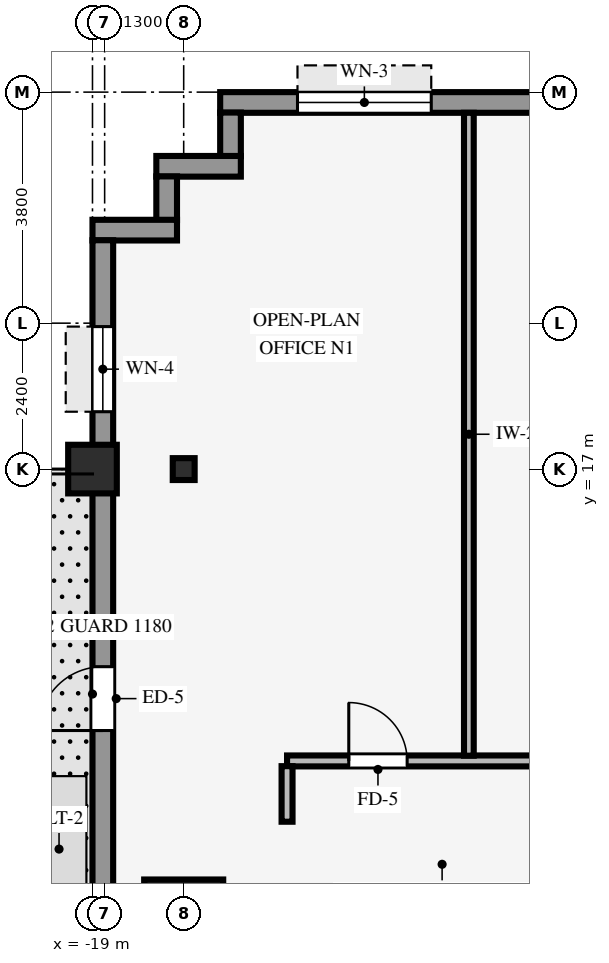
"""IFC4 building model, lengths in metres.
Left out: names, types, materials, properties, quantities, classifications, styles, units other than length and angle.
Written with IfcOpenShell. Run it as: python <this file> out.ifc"""

import sys

from ifc_helpers import new_model, si_unit, direction, frame, frame_2d, origin, origin_2d, place, context, subcontext, project, spatial, rectangle, hollow_rectangle, i_section, extrude, source, transform, mapped, element, fill, save


model = new_model("IFC4")
c1 = context("Model", 3, precision=1e-05, world=origin(), true_north=direction((0.0, 1.0)))
c2 = subcontext(c1, "Body", "Model", "MODEL_VIEW")
j1 = project(units=[si_unit("LENGTHUNIT", "METRE"), si_unit("PLANEANGLEUNIT", "RADIAN")], contexts=[c1])
p1 = place(None, origin())
s1 = spatial("IfcSite", under=j1, at=p1, CompositionType="ELEMENT")
p2 = place(p1, origin())
s2 = spatial("IfcBuilding", under=s1, at=p2, CompositionType="ELEMENT")
p3 = place(p2, frame((0.0, 0.0, 27.6)))
s3 = spatial("IfcBuildingStorey", under=s2, at=p3, CompositionType="ELEMENT", Elevation=27.6)
p4 = place(p3, frame((-17.5, 9.6, 0.0), z_axis=(0.0, 0.0, 1.0), x_axis=(1.0, 0.0, 0.0)))
e1 = element("IfcColumn", 1, at=p4, inside=s3, PredefinedType="COLUMN", context=c2, shape_type="SweptSolid", body=[
    extrude(rectangle(XDim=1.3, YDim=1.3, at=origin_2d()), origin(), (0.0, 0.0, 1.0), 3.37),
])
p5 = place(p3, frame((-19.0, 17.0, 0.0), z_axis=(0.0, 0.0, 1.0), x_axis=(1.0, 0.0, 0.0)))
e2 = element("IfcColumn", 2, at=p5, inside=s3, PredefinedType="COLUMN", context=c2, shape_type="SweptSolid", body=[
    extrude(hollow_rectangle(XDim=0.8, YDim=0.8, WallThickness=0.055, InnerFilletRadius=0.055, OuterFilletRadius=0.11, at=origin_2d()), origin(), (0.0, 0.0, 1.0), 3.37),
])
p6 = place(p3, frame((-17.5, 17.0, -0.4), z_axis=(0.0, 0.0, 1.0), x_axis=(1.0, 0.0, 0.0)))
e3 = element("IfcColumn", 3, at=p6, inside=s3, PredefinedType="COLUMN", context=c2, shape_type="SweptSolid", body=[
    extrude(i_section(OverallWidth=0.36, OverallDepth=0.36, WebThickness=0.021, FlangeThickness=0.021, FilletRadius=0.018, at=origin_2d()), origin(), (0.0, 0.0, 1.0), 3.77),
])
p7 = place(p3, frame((-16.9, 23.03, 0.0), z_axis=(0.0, 0.0, 1.0), x_axis=(1.0, 0.0, 0.0)))
e4 = element("IfcWall", 4, at=p7, inside=s3, PredefinedType="STANDARD", context=c2, shape_type="SweptSolid", body=[
    extrude(rectangle(XDim=33.8, YDim=0.34, at=frame_2d((16.9, 0.0))), origin(), (0.0, 0.0, 1.0), 2.705),
])
p8 = place(p7, frame((11.6, 0.0, 0.0)))
e5 = element("IfcOpeningElement", 5, at=p8, cuts=e4, PredefinedType="OPENING", context=c2, shape_type="SweptSolid", body=[
    extrude(rectangle(XDim=0.98, YDim=2.15, at=frame_2d((0.49, 1.075))), frame((0.0, 0.18, 0.0), z_axis=(0.0, -1.0, 0.0), x_axis=(1.0, 0.0, 0.0)), (0.0, 0.0, 1.0), 0.36),
])
p9 = place(p7, frame((1.271, 0.0, 0.8)))
e6 = element("IfcOpeningElement", 6, at=p9, cuts=e4, PredefinedType="OPENING", context=c2, shape_type="SweptSolid", body=[
    extrude(rectangle(XDim=2.2, YDim=1.65, at=frame_2d((1.1, 0.825))), frame((0.0, 0.18, 0.0), z_axis=(0.0, -1.0, 0.0), x_axis=(1.0, 0.0, 0.0)), (0.0, 0.0, 1.0), 0.36),
])
p10 = place(p7, frame((20.343, 0.0, 0.8)))
e7 = element("IfcOpeningElement", 7, at=p10, cuts=e4, PredefinedType="OPENING", context=c2, shape_type="SweptSolid", body=[
    extrude(rectangle(XDim=2.2, YDim=1.65, at=frame_2d((1.1, 0.825))), frame((0.0, 0.18, 0.0), z_axis=(0.0, -1.0, 0.0), x_axis=(1.0, 0.0, 0.0)), (0.0, 0.0, 1.0), 0.36),
])
p11 = place(p7, frame((29.429, 0.0, 0.8)))
e8 = element("IfcOpeningElement", 8, at=p11, cuts=e4, PredefinedType="OPENING", context=c2, shape_type="SweptSolid", body=[
    extrude(rectangle(XDim=2.2, YDim=1.65, at=frame_2d((1.1, 0.825))), frame((0.0, 0.18, 0.0), z_axis=(0.0, -1.0, 0.0), x_axis=(1.0, 0.0, 0.0)), (0.0, 0.0, 1.0), 0.36),
])
p12 = place(p3, frame((-16.73, 22.146, 0.0), z_axis=(0.0, 0.0, 1.0), x_axis=(0.0, 1.0, 0.0)))
e9 = element("IfcWall", 9, at=p12, inside=s3, PredefinedType="STANDARD", context=c2, shape_type="SweptSolid", body=[
    extrude(rectangle(XDim=0.718, YDim=0.34, at=frame_2d((0.359, 0.0))), origin(), (0.0, 0.0, 1.0), 3.36),
])
p13 = place(p3, frame((-17.95, 21.98, 0.0), z_axis=(0.0, 0.0, 1.0), x_axis=(1.0, 0.0, 0.0)))
e10 = element("IfcWall", 10, at=p13, inside=s3, PredefinedType="STANDARD", context=c2, shape_type="SweptSolid", body=[
    extrude(rectangle(XDim=1.39, YDim=0.34, at=frame_2d((0.695, 0.0))), origin(), (0.0, 0.0, 1.0), 3.36),
])
p14 = place(p3, frame((-17.78, 21.096, 0.0), z_axis=(0.0, 0.0, 1.0), x_axis=(0.0, 1.0, 0.0)))
e11 = element("IfcWall", 11, at=p14, inside=s3, PredefinedType="STANDARD", context=c2, shape_type="SweptSolid", body=[
    extrude(rectangle(XDim=0.718, YDim=0.34, at=frame_2d((0.359, 0.0))), origin(), (0.0, 0.0, 1.0), 3.36),
])
p15 = place(p3, frame((-19.0, 20.93, 0.0), z_axis=(0.0, 0.0, 1.0), x_axis=(1.0, 0.0, 0.0)))
e12 = element("IfcWall", 12, at=p15, inside=s3, PredefinedType="STANDARD", context=c2, shape_type="SweptSolid", body=[
    extrude(rectangle(XDim=1.39, YDim=0.34, at=frame_2d((0.695, 0.0))), origin(), (0.0, 0.0, 1.0), 3.36),
])
p16 = place(p3, frame((-18.83, -20.764, 0.0), z_axis=(0.0, 0.0, 1.0), x_axis=(0.0, 1.0, 0.0)))
e13 = element("IfcWall", 13, at=p16, inside=s3, PredefinedType="STANDARD", context=c2, shape_type="SweptSolid", body=[
    extrude(rectangle(XDim=41.528, YDim=0.34, at=frame_2d((20.764, 0.0))), origin(), (0.0, 0.0, 1.0), 2.705),
])
p17 = place(p16, frame((33.464, 0.0, 0.0)))
e14 = element("IfcOpeningElement", 14, at=p17, cuts=e13, PredefinedType="OPENING", context=c2, shape_type="SweptSolid", body=[
    extrude(rectangle(XDim=1.05, YDim=2.1, at=frame_2d((0.525, 1.05))), frame((0.0, 0.18, 0.0), z_axis=(0.0, -1.0, 0.0), x_axis=(1.0, 0.0, 0.0)), (0.0, 0.0, 1.0), 0.36),
])
p18 = place(p16, frame((1.42, 0.0, 0.8)))
e15 = element("IfcOpeningElement", 15, at=p18, cuts=e13, PredefinedType="OPENING", context=c2, shape_type="SweptSolid", body=[
    extrude(rectangle(XDim=1.4, YDim=1.65, at=frame_2d((0.7, 0.825))), frame((0.0, 0.18, 0.0), z_axis=(0.0, -1.0, 0.0), x_axis=(1.0, 0.0, 0.0)), (0.0, 0.0, 1.0), 0.36),
])
p19 = place(p16, frame((7.711, 0.0, 0.8)))
e16 = element("IfcOpeningElement", 16, at=p19, cuts=e13, PredefinedType="OPENING", context=c2, shape_type="SweptSolid", body=[
    extrude(rectangle(XDim=1.4, YDim=1.65, at=frame_2d((0.7, 0.825))), frame((0.0, 0.18, 0.0), z_axis=(0.0, -1.0, 0.0), x_axis=(1.0, 0.0, 0.0)), (0.0, 0.0, 1.0), 0.36),
])
p20 = place(p16, frame((38.708, 0.0, 0.8)))
e17 = element("IfcOpeningElement", 17, at=p20, cuts=e13, PredefinedType="OPENING", context=c2, shape_type="SweptSolid", body=[
    extrude(rectangle(XDim=1.4, YDim=1.65, at=frame_2d((0.7, 0.825))), frame((0.0, 0.18, 0.0), z_axis=(0.0, -1.0, 0.0), x_axis=(1.0, 0.0, 0.0)), (0.0, 0.0, 1.0), 0.36),
])
p21 = place(p3, frame((-15.8, 12.2, 0.0), z_axis=(0.0, 0.0, 1.0), x_axis=(1.0, 0.0, 0.0)))
e18 = element("IfcWall", 18, at=p21, inside=s3, PredefinedType="PARTITIONING", context=c2, shape_type="SweptSolid", body=[
    extrude(rectangle(XDim=24.6, YDim=0.18, at=frame_2d((12.3, 0.0))), origin(), (0.0, 0.0, 1.0), 3.36),
])
p22 = place(p21, frame((7.315, 0.0, 0.0)))
e19 = element("IfcOpeningElement", 19, at=p22, cuts=e18, PredefinedType="OPENING", context=c2, shape_type="SweptSolid", body=[
    extrude(rectangle(XDim=0.96, YDim=2.1, at=frame_2d((0.48, 1.05))), frame((0.0, 0.1, 0.0), z_axis=(0.0, -1.0, 0.0), x_axis=(1.0, 0.0, 0.0)), (0.0, 0.0, 1.0), 0.2),
])
p23 = place(p21, frame((1.015, 0.0, 0.0)))
e20 = element("IfcOpeningElement", 20, at=p23, cuts=e18, PredefinedType="OPENING", context=c2, shape_type="SweptSolid", body=[
    extrude(rectangle(XDim=0.96, YDim=2.1, at=frame_2d((0.48, 1.05))), frame((0.0, 0.1, 0.0), z_axis=(0.0, -1.0, 0.0), x_axis=(1.0, 0.0, 0.0)), (0.0, 0.0, 1.0), 0.2),
])
p24 = place(p21, frame((20.45, 0.0, 0.0)))
e21 = element("IfcOpeningElement", 21, at=p24, cuts=e18, PredefinedType="OPENING", context=c2, shape_type="SweptSolid", body=[
    extrude(rectangle(XDim=0.9, YDim=2.1, at=frame_2d((0.45, 1.05))), frame((0.0, 0.1, 0.0), z_axis=(0.0, -1.0, 0.0), x_axis=(1.0, 0.0, 0.0)), (0.0, 0.0, 1.0), 0.2),
])
p25 = place(p21, frame((17.85, 0.0, 0.0)))
e22 = element("IfcOpeningElement", 22, at=p25, cuts=e18, PredefinedType="OPENING", context=c2, shape_type="SweptSolid", body=[
    extrude(rectangle(XDim=0.9, YDim=2.1, at=frame_2d((0.45, 1.05))), frame((0.0, 0.1, 0.0), z_axis=(0.0, -1.0, 0.0), x_axis=(1.0, 0.0, 0.0)), (0.0, 0.0, 1.0), 0.2),
])
p26 = place(p21, frame((22.95, 0.0, 0.0)))
e23 = element("IfcOpeningElement", 23, at=p26, cuts=e18, PredefinedType="OPENING", context=c2, shape_type="SweptSolid", body=[
    extrude(rectangle(XDim=0.9, YDim=2.1, at=frame_2d((0.45, 1.05))), frame((0.0, 0.1, 0.0), z_axis=(0.0, -1.0, 0.0), x_axis=(1.0, 0.0, 0.0)), (0.0, 0.0, 1.0), 0.2),
])
p27 = place(p21, frame((15.52, 0.0, 0.0)))
e24 = element("IfcOpeningElement", 24, at=p27, cuts=e18, PredefinedType="OPENING", context=c2, shape_type="SweptSolid", body=[
    extrude(rectangle(XDim=0.96, YDim=2.1, at=frame_2d((0.48, 1.05))), frame((0.0, 0.1, 0.0), z_axis=(0.0, -1.0, 0.0), x_axis=(1.0, 0.0, 0.0)), (0.0, 0.0, 1.0), 0.2),
])
p28 = place(p3, frame((-15.8, 11.2, 0.0), z_axis=(0.0, 0.0, 1.0), x_axis=(0.0, 1.0, 0.0)))
e25 = element("IfcWall", 25, at=p28, inside=s3, PredefinedType="PARTITIONING", context=c2, shape_type="SweptSolid", body=[
    extrude(rectangle(XDim=0.914, YDim=0.18, at=frame_2d((0.457, 0.0))), origin(), (0.0, 0.0, 1.0), 3.36),
])
p29 = place(p3, frame((-12.81, 12.286, 0.0), z_axis=(0.0, 0.0, 1.0), x_axis=(0.0, 1.0, 0.0)))
e26 = element("IfcWall", 26, at=p29, inside=s3, PredefinedType="PARTITIONING", context=c2, shape_type="SweptSolid", body=[
    extrude(rectangle(XDim=10.574, YDim=0.16, at=frame_2d((5.287, 0.0))), origin(), (0.0, 0.0, 1.0), 3.36),
])
m1 = source(origin(), c2, "Body", "SweptSolid", [
    extrude(rectangle(XDim=2.2, YDim=1.65, at=frame_2d((1.1, 0.825))), frame((0.0, 0.03, 0.0), z_axis=(0.0, -1.0, 0.0), x_axis=(1.0, 0.0, 0.0)), (0.0, 0.0, 1.0), 0.06),
])
p30 = place(p9, origin())
e27 = element("IfcWindow", 27, at=p30, inside=s3, PartitioningType="SINGLE_PANEL", PredefinedType="WINDOW", context=c2, shape_type="MappedRepresentation", body=[
    mapped(m1, transform((0.0, 0.0, 0.0), scale=1.0)),
])
fill(e6, e27)
m2 = source(origin(), c2, "Body", "SweptSolid", [
    extrude(rectangle(XDim=1.05, YDim=2.1, at=frame_2d((0.525, 1.05))), frame((0.0, 0.025, 0.0), z_axis=(0.0, -1.0, 0.0), x_axis=(1.0, 0.0, 0.0)), (0.0, 0.0, 1.0), 0.05),
])
p31 = place(p17, origin())
e28 = element("IfcDoor", 28, at=p31, inside=s3, OperationType="SINGLE_SWING_LEFT", PredefinedType="DOOR", context=c2, shape_type="MappedRepresentation", body=[
    mapped(m2, transform((0.0, 0.0, 0.0), scale=1.0)),
])
fill(e14, e28)
m3 = source(origin(), c2, "Body", "SweptSolid", [
    extrude(rectangle(XDim=1.4, YDim=1.65, at=frame_2d((0.7, 0.825))), frame((0.0, 0.03, 0.0), z_axis=(0.0, -1.0, 0.0), x_axis=(1.0, 0.0, 0.0)), (0.0, 0.0, 1.0), 0.06),
])
p32 = place(p20, origin())
e29 = element("IfcWindow", 29, at=p32, inside=s3, PartitioningType="SINGLE_PANEL", PredefinedType="WINDOW", context=c2, shape_type="MappedRepresentation", body=[
    mapped(m3, transform((0.0, 0.0, 0.0), scale=1.0)),
])
fill(e17, e29)
m4 = source(origin(), c2, "Body", "SweptSolid", [
    extrude(rectangle(XDim=0.96, YDim=2.1, at=frame_2d((0.48, 1.05))), frame((0.0, 0.025, 0.0), z_axis=(0.0, -1.0, 0.0), x_axis=(1.0, 0.0, 0.0)), (0.0, 0.0, 1.0), 0.05),
])
p33 = place(p23, origin())
e30 = element("IfcDoor", 30, at=p33, inside=s3, OperationType="SINGLE_SWING_LEFT", PredefinedType="DOOR", context=c2, shape_type="MappedRepresentation", body=[
    mapped(m4, transform((0.0, 0.0, 0.0), scale=1.0)),
])
fill(e20, e30)
save(model, sys.argv[1])
